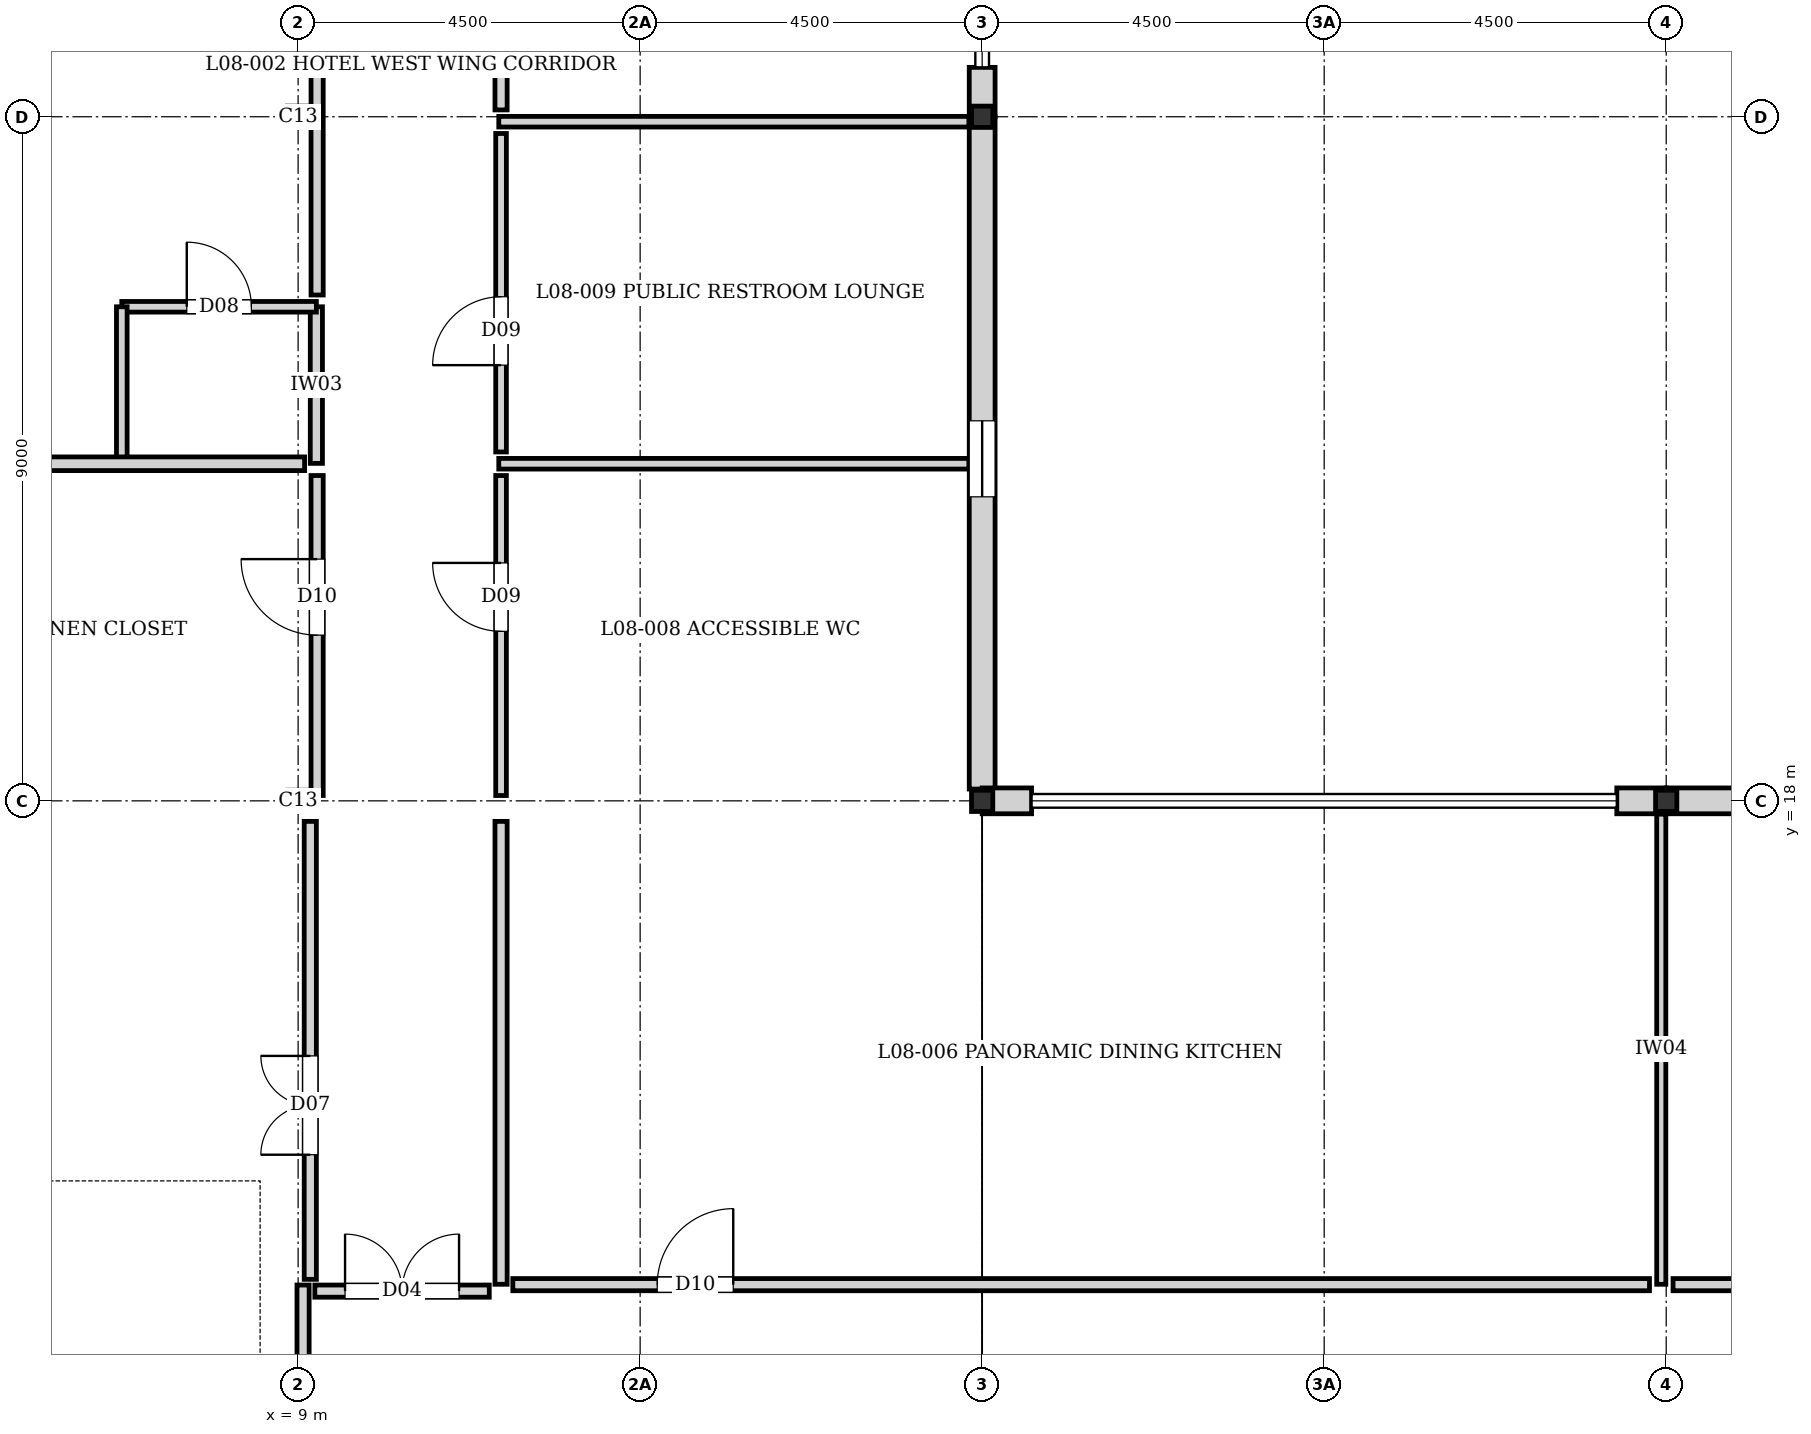
"""IFC4 building model, lengths in metres.
Left out: names, types, materials, properties, quantities, classifications, styles, units other than length and angle.
Written with IfcOpenShell. Run it as: python <this file> out.ifc"""

import sys

from ifc_helpers import new_model, si_unit, direction, frame, frame_2d, origin, origin_2d, place, context, subcontext, project, spatial, rectangle, i_section, extrude, element, fill, save


model = new_model("IFC4")
c1 = context("Model", 3, precision=1e-05, world=origin(), true_north=direction((0.0, 1.0)))
c2 = subcontext(c1, "Body", "Model", "MODEL_VIEW")
j1 = project(units=[si_unit("LENGTHUNIT", "METRE"), si_unit("PLANEANGLEUNIT", "RADIAN")], contexts=[c1])
p1 = place(None, origin())
s1 = spatial("IfcSite", under=j1, at=p1, CompositionType="ELEMENT")
p2 = place(p1, origin())
s2 = spatial("IfcBuilding", under=s1, at=p2, CompositionType="ELEMENT")
p3 = place(p2, frame((0.0, 0.0, 26.88)))
s3 = spatial("IfcBuildingStorey", under=s2, at=p3, CompositionType="ELEMENT", Elevation=26.88)
for number, where, z_axis, x_axis in (
    (1, (9.0, 18.0, 0.0), (0.0, 0.0, 1.0), (1.0, 0.0, 0.0)),
    (2, (9.0, 27.0, 0.0), (0.0, 0.0, 1.0), (1.0, 0.0, 0.0)),
    (3, (18.0, 18.0, 0.0), (0.0, 0.0, 1.0), (1.0, 0.0, 0.0)),
    (4, (18.0, 27.0, 0.0), (0.0, 0.0, 1.0), (1.0, 0.0, 0.0)),
    (5, (27.0, 18.0, 0.0), (0.0, 0.0, 1.0), (1.0, 0.0, 0.0)),
):
    element("IfcColumn", number, at=place(p3, frame(where, z_axis=z_axis, x_axis=x_axis)), inside=s3, PredefinedType="COLUMN", context=c2, shape_type="SweptSolid", body=[
        extrude(i_section(OverallWidth=0.28, OverallDepth=0.28, WebThickness=0.01, FlangeThickness=0.018, at=origin_2d()), origin(), (0.0, 0.0, 1.0), 3.52),
    ])
p4 = place(p3, frame((18.0, 27.65, 0.0), z_axis=(0.0, 0.0, 1.0), x_axis=(0.0, -1.0, 0.0)))
e6 = element("IfcWall", 6, at=p4, inside=s3, PredefinedType="SOLIDWALL", context=c2, shape_type="SweptSolid", body=[
    extrude(rectangle(XDim=0.65, YDim=0.34, at=frame_2d((0.325, 0.0))), origin(), (0.0, 0.0, 1.0), 2.91),
])
p5 = place(p3, frame((18.0, 27.0, 0.0), z_axis=(0.0, 0.0, 1.0), x_axis=(0.0, -1.0, 0.0)))
e7 = element("IfcWall", 7, at=p5, inside=s3, PredefinedType="SOLIDWALL", context=c2, shape_type="SweptSolid", body=[
    extrude(rectangle(XDim=8.845, YDim=0.34, at=frame_2d((4.422, 0.0))), origin(), (0.0, 0.0, 1.0), 2.97),
])
p6 = place(p5, frame((4.0, 0.0, 0.4)))
e8 = element("IfcOpeningElement", 8, at=p6, cuts=e7, PredefinedType="OPENING", context=c2, shape_type="SweptSolid", body=[
    extrude(rectangle(XDim=1.0, YDim=1.6, at=frame_2d((0.5, 0.8))), frame((0.0, 0.18, 0.0), z_axis=(0.0, -1.0, 0.0), x_axis=(1.0, 0.0, 0.0)), (0.0, 0.0, 1.0), 0.36),
])
for number, where, z_axis, x_axis in (
    (9, (18.0, 18.0, 0.0), (0.0, 0.0, 1.0), (1.0, 0.0, 0.0)),
    (10, (26.35, 18.0, 0.0), (0.0, 0.0, 1.0), (1.0, 0.0, 0.0)),
):
    element("IfcWall", number, at=place(p3, frame(where, z_axis=z_axis, x_axis=x_axis)), inside=s3, PredefinedType="SOLIDWALL", context=c2, shape_type="SweptSolid", body=[
        extrude(rectangle(XDim=0.65, YDim=0.34, at=frame_2d((0.325, 0.0))), origin(), (0.0, 0.0, 1.0), 3.04),
    ])
p7 = place(p3, frame((27.0, 18.0, 0.0), z_axis=(0.0, 0.0, 1.0), x_axis=(1.0, 0.0, 0.0)))
e11 = element("IfcWall", 11, at=p7, inside=s3, PredefinedType="SOLIDWALL", context=c2, shape_type="SweptSolid", body=[
    extrude(rectangle(XDim=9.0, YDim=0.34, at=frame_2d((4.5, 0.0))), origin(), (0.0, 0.0, 1.0), 2.97),
])
p8 = place(p7, frame((3.3, 0.0, 0.4)))
e12 = element("IfcOpeningElement", 12, at=p8, cuts=e11, PredefinedType="OPENING", context=c2, shape_type="SweptSolid", body=[
    extrude(rectangle(XDim=2.4, YDim=1.95, at=frame_2d((1.2, 0.975))), frame((0.0, 0.18, 0.0), z_axis=(0.0, -1.0, 0.0), x_axis=(1.0, 0.0, 0.0)), (0.0, 0.0, 1.0), 0.36),
])
p9 = place(p3, frame((9.24, 22.44, 0.0), z_axis=(0.0, 0.0, 1.0), x_axis=(0.0, 1.0, 0.0)))
e13 = element("IfcWall", 13, at=p9, inside=s3, PredefinedType="PARTITIONING", context=c2, shape_type="SweptSolid", body=[
    extrude(rectangle(XDim=2.06, YDim=0.16, at=frame_2d((1.03, 0.0))), origin(), (0.0, 0.0, 1.0), 3.27),
])
p10 = place(p3, frame((6.68, 24.5, 0.0), z_axis=(0.0, 0.0, 1.0), x_axis=(1.0, 0.0, 0.0)))
e14 = element("IfcWall", 14, at=p10, inside=s3, PredefinedType="PLUMBINGWALL", context=c2, shape_type="SweptSolid", body=[
    extrude(rectangle(XDim=2.56, YDim=0.14, at=frame_2d((1.28, 0.0))), origin(), (0.0, 0.0, 1.0), 3.27),
])
p11 = place(p10, frame((0.855, 0.0, 0.0)))
e15 = element("IfcOpeningElement", 15, at=p11, cuts=e14, PredefinedType="OPENING", context=c2, shape_type="SweptSolid", body=[
    extrude(rectangle(XDim=0.85, YDim=2.04, at=frame_2d((0.425, 1.02))), frame((0.0, 0.08, 0.0), z_axis=(0.0, -1.0, 0.0), x_axis=(1.0, 0.0, 0.0)), (0.0, 0.0, 1.0), 0.16),
])
p12 = place(p3, frame((6.68, 22.44, 0.0), z_axis=(0.0, 0.0, 1.0), x_axis=(0.0, 1.0, 0.0)))
e16 = element("IfcWall", 16, at=p12, inside=s3, PredefinedType="PLUMBINGWALL", context=c2, shape_type="SweptSolid", body=[
    extrude(rectangle(XDim=2.06, YDim=0.14, at=frame_2d((1.03, 0.0))), origin(), (0.0, 0.0, 1.0), 3.27),
])
p13 = place(p3, frame((0.095, 22.435, 0.0), z_axis=(0.0, 0.0, 1.0), x_axis=(1.0, 0.0, 0.0)))
e17 = element("IfcWall", 17, at=p13, inside=s3, PredefinedType="PARTITIONING", context=c2, shape_type="SweptSolid", body=[
    extrude(rectangle(XDim=8.99, YDim=0.18, at=frame_2d((4.495, 0.0))), origin(), (0.0, 0.0, 1.0), 3.27),
])
p14 = place(p3, frame((9.065, 9.155, 0.0), z_axis=(0.0, 0.0, 1.0), x_axis=(0.0, 1.0, 0.0)))
e18 = element("IfcWall", 18, at=p14, inside=s3, PredefinedType="PARTITIONING", context=c2, shape_type="SweptSolid", body=[
    extrude(rectangle(XDim=2.475, YDim=0.16, at=frame_2d((1.237, 0.0))), origin(), (0.0, 0.0, 1.0), 3.27),
])
p15 = place(p3, frame((11.67, 11.64, 0.0), z_axis=(0.0, 0.0, 1.0), x_axis=(0.0, 1.0, 0.0)))
e19 = element("IfcWall", 19, at=p15, inside=s3, PredefinedType="PARTITIONING", context=c2, shape_type="SweptSolid", body=[
    extrude(rectangle(XDim=6.09, YDim=0.16, at=frame_2d((3.045, 0.0))), origin(), (0.0, 0.0, 1.0), 3.27),
])
p16 = place(p3, frame((26.935, 11.64, 0.0), z_axis=(0.0, 0.0, 1.0), x_axis=(0.0, 1.0, 0.0)))
e20 = element("IfcWall", 20, at=p16, inside=s3, PredefinedType="PARTITIONING", context=c2, shape_type="SweptSolid", body=[
    extrude(rectangle(XDim=6.185, YDim=0.12, at=frame_2d((3.093, 0.0))), origin(), (0.0, 0.0, 1.0), 2.98),
])
p17 = place(p3, frame((11.64, 22.435, 0.0), z_axis=(0.0, 0.0, 1.0), x_axis=(1.0, 0.0, 0.0)))
e21 = element("IfcWall", 21, at=p17, inside=s3, PredefinedType="PLUMBINGWALL", context=c2, shape_type="SweptSolid", body=[
    extrude(rectangle(XDim=6.185, YDim=0.14, at=frame_2d((3.093, 0.0))), origin(), (0.0, 0.0, 1.0), 3.27),
])
p18 = place(p3, frame((11.64, 26.935, 0.0), z_axis=(0.0, 0.0, 1.0), x_axis=(1.0, 0.0, 0.0)))
e22 = element("IfcWall", 22, at=p18, inside=s3, PredefinedType="PLUMBINGWALL", context=c2, shape_type="SweptSolid", body=[
    extrude(rectangle(XDim=6.185, YDim=0.14, at=frame_2d((3.093, 0.0))), origin(), (0.0, 0.0, 1.0), 2.82),
])
p19 = place(p3, frame((9.22, 11.55, 0.0), z_axis=(0.0, 0.0, 1.0), x_axis=(1.0, 0.0, 0.0)))
e23 = element("IfcWall", 23, at=p19, inside=s3, PredefinedType="PARTITIONING", context=c2, shape_type="SweptSolid", body=[
    extrude(rectangle(XDim=2.295, YDim=0.16, at=frame_2d((1.147, 0.0))), origin(), (0.0, 0.0, 1.0), 3.27),
])
p20 = place(p19, frame((0.397, 0.0, 0.0)))
e24 = element("IfcOpeningElement", 24, at=p20, cuts=e23, PredefinedType="OPENING", context=c2, shape_type="SweptSolid", body=[
    extrude(rectangle(XDim=1.5, YDim=2.1, at=frame_2d((0.75, 1.05))), frame((0.0, 0.09, 0.0), z_axis=(0.0, -1.0, 0.0), x_axis=(1.0, 0.0, 0.0)), (0.0, 0.0, 1.0), 0.18),
])
p21 = place(p3, frame((11.825, 11.635, 0.0), z_axis=(0.0, 0.0, 1.0), x_axis=(1.0, 0.0, 0.0)))
e25 = element("IfcWall", 25, at=p21, inside=s3, PredefinedType="PARTITIONING", context=c2, shape_type="SweptSolid", body=[
    extrude(rectangle(XDim=14.955, YDim=0.16, at=frame_2d((7.478, 0.0))), origin(), (0.0, 0.0, 1.0), 3.27),
])
p22 = place(p21, frame((1.9, 0.0, 0.0)))
e26 = element("IfcOpeningElement", 26, at=p22, cuts=e25, PredefinedType="OPENING", context=c2, shape_type="SweptSolid", body=[
    extrude(rectangle(XDim=1.0, YDim=2.1, at=frame_2d((0.5, 1.05))), frame((0.0, 0.09, 0.0), z_axis=(0.0, -1.0, 0.0), x_axis=(1.0, 0.0, 0.0)), (0.0, 0.0, 1.0), 0.18),
])
p23 = place(p3, frame((27.09, 11.635, 0.0), z_axis=(0.0, 0.0, 1.0), x_axis=(1.0, 0.0, 0.0)))
e27 = element("IfcWall", 27, at=p23, inside=s3, PredefinedType="PARTITIONING", context=c2, shape_type="SweptSolid", body=[
    extrude(rectangle(XDim=17.735, YDim=0.16, at=frame_2d((8.867, 0.0))), origin(), (0.0, 0.0, 1.0), 3.27),
])
p24 = place(p23, frame((14.835, 0.0, 0.0)))
e28 = element("IfcOpeningElement", 28, at=p24, cuts=e27, PredefinedType="OPENING", context=c2, shape_type="SweptSolid", body=[
    extrude(rectangle(XDim=1.0, YDim=2.1, at=frame_2d((0.5, 1.05))), frame((0.0, 0.09, 0.0), z_axis=(0.0, -1.0, 0.0), x_axis=(1.0, 0.0, 0.0)), (0.0, 0.0, 1.0), 0.18),
])
p25 = place(p3, frame((9.16, 11.705, 0.0), z_axis=(0.0, 0.0, 1.0), x_axis=(0.0, 1.0, 0.0)))
e29 = element("IfcWall", 29, at=p25, inside=s3, PredefinedType="PARTITIONING", context=c2, shape_type="SweptSolid", body=[
    extrude(rectangle(XDim=6.025, YDim=0.16, at=frame_2d((3.012, 0.0))), origin(), (0.0, 0.0, 1.0), 3.27),
])
p26 = place(p25, frame((1.639, 0.0, 0.0)))
e30 = element("IfcOpeningElement", 30, at=p26, cuts=e29, PredefinedType="OPENING", context=c2, shape_type="SweptSolid", body=[
    extrude(rectangle(XDim=1.3, YDim=2.25, at=frame_2d((0.65, 1.125))), frame((0.0, 0.09, 0.0), z_axis=(0.0, -1.0, 0.0), x_axis=(1.0, 0.0, 0.0)), (0.0, 0.0, 1.0), 0.18),
])
p27 = place(p3, frame((11.67, 18.07, 0.0), z_axis=(0.0, 0.0, 1.0), x_axis=(0.0, 1.0, 0.0)))
e31 = element("IfcWall", 31, at=p27, inside=s3, PredefinedType="PLUMBINGWALL", context=c2, shape_type="SweptSolid", body=[
    extrude(rectangle(XDim=4.21, YDim=0.14, at=frame_2d((2.105, 0.0))), origin(), (0.0, 0.0, 1.0), 3.27),
])
p28 = place(p27, frame((2.16, 0.0, 0.0)))
e32 = element("IfcOpeningElement", 32, at=p28, cuts=e31, PredefinedType="OPENING", context=c2, shape_type="SweptSolid", body=[
    extrude(rectangle(XDim=0.9, YDim=2.1, at=frame_2d((0.45, 1.05))), frame((0.0, 0.08, 0.0), z_axis=(0.0, -1.0, 0.0), x_axis=(1.0, 0.0, 0.0)), (0.0, 0.0, 1.0), 0.16),
])
p29 = place(p3, frame((11.67, 22.59, 0.0), z_axis=(0.0, 0.0, 1.0), x_axis=(0.0, 1.0, 0.0)))
e33 = element("IfcWall", 33, at=p29, inside=s3, PredefinedType="PLUMBINGWALL", context=c2, shape_type="SweptSolid", body=[
    extrude(rectangle(XDim=4.19, YDim=0.14, at=frame_2d((2.095, 0.0))), origin(), (0.0, 0.0, 1.0), 3.27),
])
p30 = place(p29, frame((1.142, 0.0, 0.0)))
e34 = element("IfcOpeningElement", 34, at=p30, cuts=e33, PredefinedType="OPENING", context=c2, shape_type="SweptSolid", body=[
    extrude(rectangle(XDim=0.9, YDim=2.1, at=frame_2d((0.45, 1.05))), frame((0.0, 0.08, 0.0), z_axis=(0.0, -1.0, 0.0), x_axis=(1.0, 0.0, 0.0)), (0.0, 0.0, 1.0), 0.16),
])
p31 = place(p3, frame((9.25, 18.07, 0.0), z_axis=(0.0, 0.0, 1.0), x_axis=(0.0, 1.0, 0.0)))
e35 = element("IfcWall", 35, at=p31, inside=s3, PredefinedType="PARTITIONING", context=c2, shape_type="SweptSolid", body=[
    extrude(rectangle(XDim=4.21, YDim=0.16, at=frame_2d((2.105, 0.0))), origin(), (0.0, 0.0, 1.0), 3.27),
])
p32 = place(p31, frame((2.11, 0.0, 0.0)))
e36 = element("IfcOpeningElement", 36, at=p32, cuts=e35, PredefinedType="OPENING", context=c2, shape_type="SweptSolid", body=[
    extrude(rectangle(XDim=1.0, YDim=2.1, at=frame_2d((0.5, 1.05))), frame((0.0, 0.09, 0.0), z_axis=(0.0, -1.0, 0.0), x_axis=(1.0, 0.0, 0.0)), (0.0, 0.0, 1.0), 0.18),
])
p33 = place(p3, frame((9.25, 24.655, 0.0), z_axis=(0.0, 0.0, 1.0), x_axis=(0.0, 1.0, 0.0)))
e37 = element("IfcWall", 37, at=p33, inside=s3, PredefinedType="PARTITIONING", context=c2, shape_type="SweptSolid", body=[
    extrude(rectangle(XDim=11.19, YDim=0.16, at=frame_2d((5.595, 0.0))), origin(), (0.0, 0.0, 1.0), 3.27),
])
p34 = place(p33, frame((6.288, 0.0, 0.0)))
e38 = element("IfcOpeningElement", 38, at=p34, cuts=e37, PredefinedType="OPENING", context=c2, shape_type="SweptSolid", body=[
    extrude(rectangle(XDim=1.3, YDim=2.25, at=frame_2d((0.65, 1.125))), frame((0.0, 0.09, 0.0), z_axis=(0.0, -1.0, 0.0), x_axis=(1.0, 0.0, 0.0)), (0.0, 0.0, 1.0), 0.18),
])
p35 = place(p3, frame((11.67, 27.09, 0.0), z_axis=(0.0, 0.0, 1.0), x_axis=(0.0, 1.0, 0.0)))
e39 = element("IfcWall", 39, at=p35, inside=s3, PredefinedType="PARTITIONING", context=c2, shape_type="SweptSolid", body=[
    extrude(rectangle(XDim=17.735, YDim=0.16, at=frame_2d((8.867, 0.0))), origin(), (0.0, 0.0, 1.0), 3.27),
])
p36 = place(p35, frame((14.835, 0.0, 0.0)))
e40 = element("IfcOpeningElement", 40, at=p36, cuts=e39, PredefinedType="OPENING", context=c2, shape_type="SweptSolid", body=[
    extrude(rectangle(XDim=1.0, YDim=2.1, at=frame_2d((0.5, 1.05))), frame((0.0, 0.09, 0.0), z_axis=(0.0, -1.0, 0.0), x_axis=(1.0, 0.0, 0.0)), (0.0, 0.0, 1.0), 0.18),
])
p37 = place(p6, origin())
e41 = element("IfcWindow", 41, at=p37, inside=s3, PartitioningType="SINGLE_PANEL", PredefinedType="WINDOW", context=c2, shape_type="SweptSolid", body=[
    extrude(rectangle(XDim=1.0, YDim=1.6, at=frame_2d((0.5, 0.8))), frame((0.0, 0.03, 0.0), z_axis=(0.0, -1.0, 0.0), x_axis=(1.0, 0.0, 0.0)), (0.0, 0.0, 1.0), 0.06),
])
fill(e8, e41)
p38 = place(p11, origin())
e42 = element("IfcDoor", 42, at=p38, inside=s3, OperationType="SINGLE_SWING_LEFT", PredefinedType="DOOR", context=c2, shape_type="SweptSolid", body=[
    extrude(rectangle(XDim=0.85, YDim=2.04, at=frame_2d((0.425, 1.02))), frame((0.0, 0.025, 0.0), z_axis=(0.0, -1.0, 0.0), x_axis=(1.0, 0.0, 0.0)), (0.0, 0.0, 1.0), 0.05),
])
fill(e15, e42)
p39 = place(p20, origin())
e43 = element("IfcDoor", 43, at=p39, inside=s3, OperationType="DOUBLE_DOOR_SINGLE_SWING", PredefinedType="DOOR", context=c2, shape_type="SweptSolid", body=[
    extrude(rectangle(XDim=1.5, YDim=2.1, at=frame_2d((0.75, 1.05))), frame((0.0, 0.025, 0.0), z_axis=(0.0, -1.0, 0.0), x_axis=(1.0, 0.0, 0.0)), (0.0, 0.0, 1.0), 0.05),
])
fill(e24, e43)
p40 = place(p22, origin())
e44 = element("IfcDoor", 44, at=p40, inside=s3, OperationType="SINGLE_SWING_RIGHT", PredefinedType="DOOR", context=c2, shape_type="SweptSolid", body=[
    extrude(rectangle(XDim=1.0, YDim=2.1, at=frame_2d((0.5, 1.05))), frame((0.0, 0.025, 0.0), z_axis=(0.0, -1.0, 0.0), x_axis=(1.0, 0.0, 0.0)), (0.0, 0.0, 1.0), 0.05),
])
fill(e26, e44)
p41 = place(p26, origin())
e45 = element("IfcDoor", 45, at=p41, inside=s3, OperationType="DOUBLE_DOOR_SINGLE_SWING", PredefinedType="DOOR", context=c2, shape_type="SweptSolid", body=[
    extrude(rectangle(XDim=1.3, YDim=2.25, at=frame_2d((0.65, 1.125))), frame((0.0, 0.025, 0.0), z_axis=(0.0, -1.0, 0.0), x_axis=(1.0, 0.0, 0.0)), (0.0, 0.0, 1.0), 0.05),
])
fill(e30, e45)
p42 = place(p28, origin())
e46 = element("IfcDoor", 46, at=p42, inside=s3, OperationType="SINGLE_SWING_RIGHT", PredefinedType="DOOR", context=c2, shape_type="SweptSolid", body=[
    extrude(rectangle(XDim=0.9, YDim=2.1, at=frame_2d((0.45, 1.05))), frame((0.0, 0.025, 0.0), z_axis=(0.0, -1.0, 0.0), x_axis=(1.0, 0.0, 0.0)), (0.0, 0.0, 1.0), 0.05),
])
fill(e32, e46)
p43 = place(p30, origin())
e47 = element("IfcDoor", 47, at=p43, inside=s3, OperationType="SINGLE_SWING_LEFT", PredefinedType="DOOR", context=c2, shape_type="SweptSolid", body=[
    extrude(rectangle(XDim=0.9, YDim=2.1, at=frame_2d((0.45, 1.05))), frame((0.0, 0.025, 0.0), z_axis=(0.0, -1.0, 0.0), x_axis=(1.0, 0.0, 0.0)), (0.0, 0.0, 1.0), 0.05),
])
fill(e34, e47)
p44 = place(p32, origin())
e48 = element("IfcDoor", 48, at=p44, inside=s3, OperationType="SINGLE_SWING_RIGHT", PredefinedType="DOOR", context=c2, shape_type="SweptSolid", body=[
    extrude(rectangle(XDim=1.0, YDim=2.1, at=frame_2d((0.5, 1.05))), frame((0.0, 0.025, 0.0), z_axis=(0.0, -1.0, 0.0), x_axis=(1.0, 0.0, 0.0)), (0.0, 0.0, 1.0), 0.05),
])
fill(e36, e48)
save(model, sys.argv[1])
